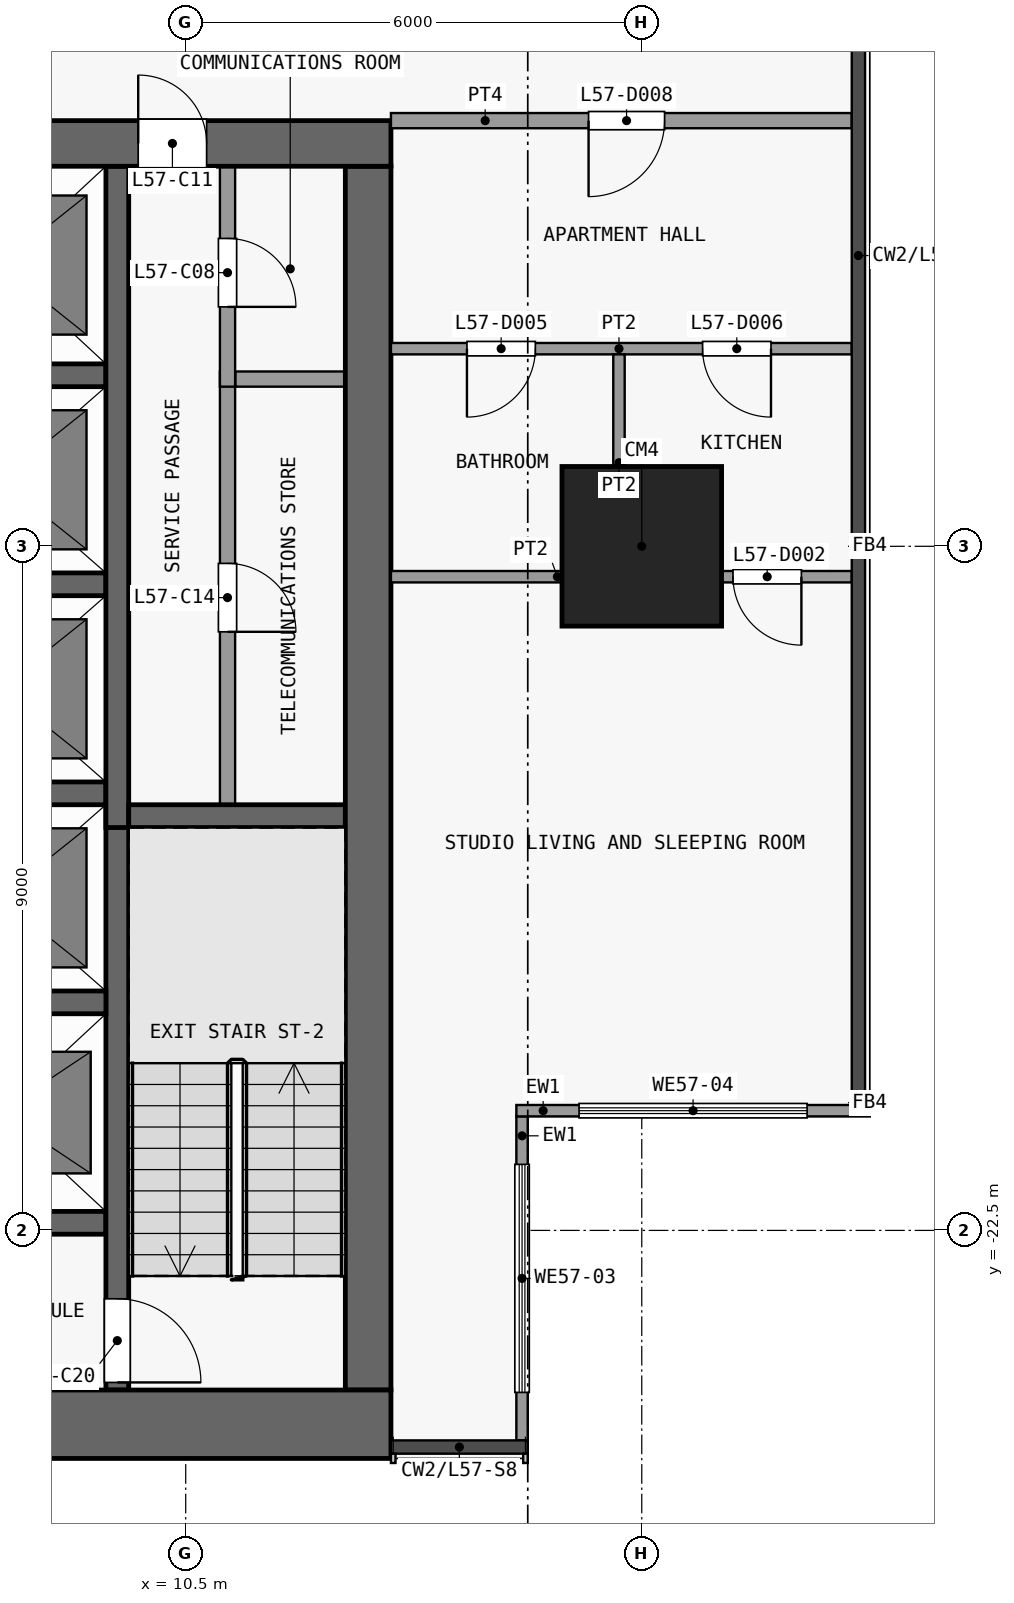
"""IFC4 building model, lengths in metres.
Left out: names, types, materials, properties, quantities, classifications, styles, units other than length and angle.
Written with IfcOpenShell. Run it as: python <this file> out.ifc"""

import sys

from ifc_helpers import new_model, si_unit, direction, frame, frame_2d, origin, origin_2d, place, context, subcontext, project, spatial, rectangle, extrude, element, fill, save


model = new_model("IFC4")
c1 = context("Model", 3, precision=1e-05, world=origin(), true_north=direction((0.0, 1.0)))
c2 = subcontext(c1, "Body", "Model", "MODEL_VIEW")
j1 = project(units=[si_unit("LENGTHUNIT", "METRE"), si_unit("PLANEANGLEUNIT", "RADIAN")], contexts=[c1])
p1 = place(None, origin())
s1 = spatial("IfcSite", under=j1, at=p1, CompositionType="ELEMENT")
p2 = place(p1, origin())
s2 = spatial("IfcBuilding", under=s1, at=p2, CompositionType="ELEMENT")
p3 = place(p2, frame((0.0, 0.0, 226.7)))
s3 = spatial("IfcBuildingStorey", under=s2, at=p3, CompositionType="ELEMENT", Elevation=226.7)
p4 = place(p3, frame((16.5, -13.5, 0.0), z_axis=(0.0, 0.0, 1.0), x_axis=(1.0, 0.0, 0.0)))
e1 = element("IfcColumn", 1, at=p4, inside=s3, PredefinedType="COLUMN", context=c2, shape_type="SweptSolid", body=[
    extrude(rectangle(XDim=2.1, YDim=2.1, at=origin_2d()), origin(), (0.0, 0.0, 1.0), 3.6),
])
p5 = place(p3, frame((-13.2, -25.05, 0.0), z_axis=(0.0, 0.0, 1.0), x_axis=(1.0, 0.0, 0.0)))
e2 = element("IfcWall", 2, at=p5, inside=s3, PredefinedType="SHEAR", context=c2, shape_type="SweptSolid", body=[
    extrude(rectangle(XDim=26.4, YDim=0.9, at=frame_2d((13.2, 0.0))), origin(), (0.0, 0.0, 1.0), 3.3),
])
p6 = place(p3, frame((-13.2, -8.2, 0.0), z_axis=(0.0, 0.0, 1.0), x_axis=(1.0, 0.0, 0.0)))
e3 = element("IfcWall", 3, at=p6, inside=s3, PredefinedType="SHEAR", context=c2, shape_type="SweptSolid", body=[
    extrude(rectangle(XDim=26.4, YDim=0.6, at=frame_2d((13.2, 0.0))), origin(), (0.0, 0.0, 1.0), 3.3),
])
p7 = place(p6, frame((7.5, 0.0, 0.0)))
e4 = element("IfcOpeningElement", 4, at=p7, cuts=e3, PredefinedType="OPENING", context=c2, shape_type="SweptSolid", body=[
    extrude(rectangle(XDim=1.8, YDim=2.1, at=frame_2d((0.9, 1.05))), frame((0.0, 0.31, 0.0), z_axis=(0.0, -1.0, 0.0), x_axis=(1.0, 0.0, 0.0)), (0.0, 0.0, 1.0), 0.62),
])
p8 = place(p6, frame((17.1, 0.0, 0.0)))
e5 = element("IfcOpeningElement", 5, at=p8, cuts=e3, PredefinedType="OPENING", context=c2, shape_type="SweptSolid", body=[
    extrude(rectangle(XDim=1.8, YDim=2.1, at=frame_2d((0.9, 1.05))), frame((0.0, 0.31, 0.0), z_axis=(0.0, -1.0, 0.0), x_axis=(1.0, 0.0, 0.0)), (0.0, 0.0, 1.0), 0.62),
])
p9 = place(p6, frame((2.425, 0.0, 0.0)))
e6 = element("IfcOpeningElement", 6, at=p9, cuts=e3, PredefinedType="OPENING", context=c2, shape_type="SweptSolid", body=[
    extrude(rectangle(XDim=0.9, YDim=2.1, at=frame_2d((0.45, 1.05))), frame((0.0, 0.31, 0.0), z_axis=(0.0, -1.0, 0.0), x_axis=(1.0, 0.0, 0.0)), (0.0, 0.0, 1.0), 0.62),
])
p10 = place(p6, frame((23.075, 0.0, 0.0)))
e7 = element("IfcOpeningElement", 7, at=p10, cuts=e3, PredefinedType="OPENING", context=c2, shape_type="SweptSolid", body=[
    extrude(rectangle(XDim=0.9, YDim=2.1, at=frame_2d((0.45, 1.05))), frame((0.0, 0.31, 0.0), z_axis=(0.0, -1.0, 0.0), x_axis=(1.0, 0.0, 0.0)), (0.0, 0.0, 1.0), 0.62),
])
p11 = place(p3, frame((12.9, -24.6, 0.0), z_axis=(0.0, 0.0, 1.0), x_axis=(0.0, 1.0, 0.0)))
e8 = element("IfcWall", 8, at=p11, inside=s3, PredefinedType="SHEAR", context=c2, shape_type="SweptSolid", body=[
    extrude(rectangle(XDim=16.1, YDim=0.6, at=frame_2d((8.05, 0.0))), origin(), (0.0, 0.0, 1.0), 3.3),
])
for number, where, z_axis, x_axis in (
    (9, (6.65, -22.4, 0.0), (0.0, 0.0, 1.0), (1.0, 0.0, 0.0)),
    (10, (6.65, -19.5, 0.0), (0.0, 0.0, 1.0), (1.0, 0.0, 0.0)),
):
    element("IfcWall", number, at=place(p3, frame(where, z_axis=z_axis, x_axis=x_axis)), inside=s3, PredefinedType="SHEAR", context=c2, shape_type="SweptSolid", body=[
        extrude(rectangle(XDim=2.8, YDim=0.3, at=frame_2d((1.4, 0.0))), origin(), (0.0, 0.0, 1.0), 3.3),
    ])
p12 = place(p3, frame((9.75, -17.05, 0.0), z_axis=(0.0, 0.0, 1.0), x_axis=(1.0, 0.0, 0.0)))
e11 = element("IfcWall", 11, at=p12, inside=s3, PredefinedType="SHEAR", context=c2, shape_type="SweptSolid", body=[
    extrude(rectangle(XDim=2.85, YDim=0.3, at=frame_2d((1.425, 0.0))), origin(), (0.0, 0.0, 1.0), 3.3),
])
for number, where, z_axis, x_axis in (
    (12, (6.65, -16.75, 0.0), (0.0, 0.0, 1.0), (1.0, 0.0, 0.0)),
    (13, (6.65, -14.0, 0.0), (0.0, 0.0, 1.0), (1.0, 0.0, 0.0)),
):
    element("IfcWall", number, at=place(p3, frame(where, z_axis=z_axis, x_axis=x_axis)), inside=s3, PredefinedType="SHEAR", context=c2, shape_type="SweptSolid", body=[
        extrude(rectangle(XDim=2.8, YDim=0.3, at=frame_2d((1.4, 0.0))), origin(), (0.0, 0.0, 1.0), 3.3),
    ])
p13 = place(p3, frame((11.15, -11.3, 0.0), z_axis=(0.0, 0.0, 1.0), x_axis=(1.0, 0.0, 0.0)))
e14 = element("IfcWall", 14, at=p13, inside=s3, PredefinedType="PARTITIONING", context=c2, shape_type="SweptSolid", body=[
    extrude(rectangle(XDim=1.45, YDim=0.2, at=frame_2d((0.725, 0.0))), origin(), (0.0, 0.0, 1.0), 3.3),
])
p14 = place(p3, frame((6.65, -11.25, 0.0), z_axis=(0.0, 0.0, 1.0), x_axis=(1.0, 0.0, 0.0)))
e15 = element("IfcWall", 15, at=p14, inside=s3, PredefinedType="SHEAR", context=c2, shape_type="SweptSolid", body=[
    extrude(rectangle(XDim=2.8, YDim=0.3, at=frame_2d((1.4, 0.0))), origin(), (0.0, 0.0, 1.0), 3.3),
])
p15 = place(p3, frame((9.6, -16.9, 0.0), z_axis=(0.0, 0.0, 1.0), x_axis=(0.0, -1.0, 0.0)))
e16 = element("IfcWall", 16, at=p15, inside=s3, PredefinedType="SHEAR", context=c2, shape_type="SweptSolid", body=[
    extrude(rectangle(XDim=7.7, YDim=0.3, at=frame_2d((3.85, 0.0))), origin(), (0.0, 0.0, 1.0), 3.3),
])
p16 = place(p15, frame((6.5, 0.0, 0.0)))
e17 = element("IfcOpeningElement", 17, at=p16, cuts=e16, PredefinedType="OPENING", context=c2, shape_type="SweptSolid", body=[
    extrude(rectangle(XDim=1.1, YDim=2.1, at=frame_2d((0.55, 1.05))), frame((0.0, 0.16, 0.0), z_axis=(0.0, -1.0, 0.0), x_axis=(1.0, 0.0, 0.0)), (0.0, 0.0, 1.0), 0.32),
])
p17 = place(p3, frame((9.6, -17.2, 0.0), z_axis=(0.0, 0.0, 1.0), x_axis=(0.0, 1.0, 0.0)))
e18 = element("IfcWall", 18, at=p17, inside=s3, PredefinedType="SHEAR", context=c2, shape_type="SweptSolid", body=[
    extrude(rectangle(XDim=8.7, YDim=0.3, at=frame_2d((4.35, 0.0))), origin(), (0.0, 0.0, 1.0), 3.3),
])
p18 = place(p3, frame((11.05, -11.2, 0.0), z_axis=(0.0, 0.0, 1.0), x_axis=(0.0, -1.0, 0.0)))
e19 = element("IfcWall", 19, at=p18, inside=s3, PredefinedType="PARTITIONING", context=c2, shape_type="SweptSolid", body=[
    extrude(rectangle(XDim=5.7, YDim=0.2, at=frame_2d((2.85, 0.0))), origin(), (0.0, 0.0, 1.0), 3.3),
])
p19 = place(p18, frame((2.525, 0.0, 0.0)))
e20 = element("IfcOpeningElement", 20, at=p19, cuts=e19, PredefinedType="OPENING", context=c2, shape_type="SweptSolid", body=[
    extrude(rectangle(XDim=0.9, YDim=2.1, at=frame_2d((0.45, 1.05))), frame((0.0, 0.11, 0.0), z_axis=(0.0, -1.0, 0.0), x_axis=(1.0, 0.0, 0.0)), (0.0, 0.0, 1.0), 0.22),
])
p20 = place(p3, frame((11.05, -8.5, 0.0), z_axis=(0.0, 0.0, 1.0), x_axis=(0.0, -1.0, 0.0)))
e21 = element("IfcWall", 21, at=p20, inside=s3, PredefinedType="PARTITIONING", context=c2, shape_type="SweptSolid", body=[
    extrude(rectangle(XDim=2.9, YDim=0.2, at=frame_2d((1.45, 0.0))), origin(), (0.0, 0.0, 1.0), 3.3),
])
p21 = place(p20, frame((0.95, 0.0, 0.0)))
e22 = element("IfcOpeningElement", 22, at=p21, cuts=e21, PredefinedType="OPENING", context=c2, shape_type="SweptSolid", body=[
    extrude(rectangle(XDim=0.9, YDim=2.1, at=frame_2d((0.45, 1.05))), frame((0.0, 0.11, 0.0), z_axis=(0.0, -1.0, 0.0), x_axis=(1.0, 0.0, 0.0)), (0.0, 0.0, 1.0), 0.22),
])
p22 = place(p3, frame((14.925, -21.0, 0.0), z_axis=(0.0, 0.0, 1.0), x_axis=(0.0, -1.0, 0.0)))
e23 = element("IfcWall", 23, at=p22, inside=s3, PredefinedType="SOLIDWALL", context=c2, shape_type="SweptSolid", body=[
    extrude(rectangle(XDim=4.262, YDim=0.15, at=frame_2d((2.131, 0.0))), origin(), (0.0, 0.0, 1.0), 3.3),
])
p23 = place(p22, frame((0.631, 0.0, 0.9)))
e24 = element("IfcOpeningElement", 24, at=p23, cuts=e23, PredefinedType="OPENING", context=c2, shape_type="SweptSolid", body=[
    extrude(rectangle(XDim=3.0, YDim=2.4, at=frame_2d((1.5, 1.2))), frame((0.0, 0.085, 0.0), z_axis=(0.0, -1.0, 0.0), x_axis=(1.0, 0.0, 0.0)), (0.0, 0.0, 1.0), 0.17),
])
p24 = place(p3, frame((19.5, -20.925, 0.0), z_axis=(0.0, 0.0, 1.0), x_axis=(-1.0, 0.0, 0.0)))
e25 = element("IfcWall", 25, at=p24, inside=s3, PredefinedType="SOLIDWALL", context=c2, shape_type="SweptSolid", body=[
    extrude(rectangle(XDim=4.65, YDim=0.15, at=frame_2d((2.325, 0.0))), origin(), (0.0, 0.0, 1.0), 3.3),
])
p25 = place(p24, frame((0.825, 0.0, 0.9)))
e26 = element("IfcOpeningElement", 26, at=p25, cuts=e25, PredefinedType="OPENING", context=c2, shape_type="SweptSolid", body=[
    extrude(rectangle(XDim=3.0, YDim=2.4, at=frame_2d((1.5, 1.2))), frame((0.0, 0.085, 0.0), z_axis=(0.0, -1.0, 0.0), x_axis=(1.0, 0.0, 0.0)), (0.0, 0.0, 1.0), 0.17),
])
p26 = place(p3, frame((13.2, -13.9, 0.0), z_axis=(0.0, 0.0, 1.0), x_axis=(1.0, 0.0, 0.0)))
e27 = element("IfcWall", 27, at=p26, inside=s3, PredefinedType="PARTITIONING", context=c2, shape_type="SweptSolid", body=[
    extrude(rectangle(XDim=6.062, YDim=0.15, at=frame_2d((3.031, 0.0))), origin(), (0.0, 0.0, 1.0), 3.3),
])
p27 = place(p26, frame((4.5, 0.0, 0.0)))
e28 = element("IfcOpeningElement", 28, at=p27, cuts=e27, PredefinedType="OPENING", context=c2, shape_type="SweptSolid", body=[
    extrude(rectangle(XDim=0.9, YDim=2.1, at=frame_2d((0.45, 1.05))), frame((0.0, 0.085, 0.0), z_axis=(0.0, -1.0, 0.0), x_axis=(1.0, 0.0, 0.0)), (0.0, 0.0, 1.0), 0.17),
])
p28 = place(p3, frame((13.2, -10.9, 0.0), z_axis=(0.0, 0.0, 1.0), x_axis=(1.0, 0.0, 0.0)))
e29 = element("IfcWall", 29, at=p28, inside=s3, PredefinedType="PARTITIONING", context=c2, shape_type="SweptSolid", body=[
    extrude(rectangle(XDim=6.062, YDim=0.15, at=frame_2d((3.031, 0.0))), origin(), (0.0, 0.0, 1.0), 3.3),
])
p29 = place(p28, frame((1.0, 0.0, 0.0)))
e30 = element("IfcOpeningElement", 30, at=p29, cuts=e29, PredefinedType="OPENING", context=c2, shape_type="SweptSolid", body=[
    extrude(rectangle(XDim=0.9, YDim=2.1, at=frame_2d((0.45, 1.05))), frame((0.0, 0.085, 0.0), z_axis=(0.0, -1.0, 0.0), x_axis=(1.0, 0.0, 0.0)), (0.0, 0.0, 1.0), 0.17),
])
p30 = place(p28, frame((4.1, 0.0, 0.0)))
e31 = element("IfcOpeningElement", 31, at=p30, cuts=e29, PredefinedType="OPENING", context=c2, shape_type="SweptSolid", body=[
    extrude(rectangle(XDim=0.9, YDim=2.1, at=frame_2d((0.45, 1.05))), frame((0.0, 0.085, 0.0), z_axis=(0.0, -1.0, 0.0), x_axis=(1.0, 0.0, 0.0)), (0.0, 0.0, 1.0), 0.17),
])
p31 = place(p3, frame((13.2, -7.9, 0.0), z_axis=(0.0, 0.0, 1.0), x_axis=(1.0, 0.0, 0.0)))
e32 = element("IfcWall", 32, at=p31, inside=s3, PredefinedType="PARTITIONING", context=c2, shape_type="SweptSolid", body=[
    extrude(rectangle(XDim=6.062, YDim=0.2, at=frame_2d((3.031, 0.0))), origin(), (0.0, 0.0, 1.0), 3.3),
])
p32 = place(p31, frame((2.6, 0.0, 0.0)))
e33 = element("IfcOpeningElement", 33, at=p32, cuts=e32, PredefinedType="OPENING", context=c2, shape_type="SweptSolid", body=[
    extrude(rectangle(XDim=1.0, YDim=2.1, at=frame_2d((0.5, 1.05))), frame((0.0, 0.11, 0.0), z_axis=(0.0, -1.0, 0.0), x_axis=(1.0, 0.0, 0.0)), (0.0, 0.0, 1.0), 0.22),
])
p33 = place(p3, frame((16.2, -13.825, 0.0), z_axis=(0.0, 0.0, 1.0), x_axis=(0.0, 1.0, 0.0)))
e34 = element("IfcWall", 34, at=p33, inside=s3, PredefinedType="PARTITIONING", context=c2, shape_type="SweptSolid", body=[
    extrude(rectangle(XDim=2.85, YDim=0.15, at=frame_2d((1.425, 0.0))), origin(), (0.0, 0.0, 1.0), 3.3),
])
p34 = place(p21, origin())
e35 = element("IfcDoor", 35, at=p34, inside=s3, OperationType="SINGLE_SWING_RIGHT", PredefinedType="DOOR", context=c2, shape_type="SweptSolid", body=[
    extrude(rectangle(XDim=0.9, YDim=2.1, at=frame_2d((0.45, 1.05))), frame((0.0, 0.025, 0.0), z_axis=(0.0, -1.0, 0.0), x_axis=(1.0, 0.0, 0.0)), (0.0, 0.0, 1.0), 0.05),
])
fill(e22, e35)
p35 = place(p10, origin())
e36 = element("IfcDoor", 36, at=p35, inside=s3, OperationType="SINGLE_SWING_LEFT", PredefinedType="DOOR", context=c2, shape_type="SweptSolid", body=[
    extrude(rectangle(XDim=0.9, YDim=2.1, at=frame_2d((0.45, 1.05))), frame((0.0, 0.025, 0.0), z_axis=(0.0, -1.0, 0.0), x_axis=(1.0, 0.0, 0.0)), (0.0, 0.0, 1.0), 0.05),
])
fill(e7, e36)
p36 = place(p19, origin())
e37 = element("IfcDoor", 37, at=p36, inside=s3, OperationType="SINGLE_SWING_RIGHT", PredefinedType="DOOR", context=c2, shape_type="SweptSolid", body=[
    extrude(rectangle(XDim=0.9, YDim=2.1, at=frame_2d((0.45, 1.05))), frame((0.0, 0.025, 0.0), z_axis=(0.0, -1.0, 0.0), x_axis=(1.0, 0.0, 0.0)), (0.0, 0.0, 1.0), 0.05),
])
fill(e20, e37)
p37 = place(p16, origin())
e38 = element("IfcDoor", 38, at=p37, inside=s3, OperationType="SINGLE_SWING_RIGHT", PredefinedType="DOOR", context=c2, shape_type="SweptSolid", body=[
    extrude(rectangle(XDim=1.1, YDim=2.1, at=frame_2d((0.55, 1.05))), frame((0.0, 0.025, 0.0), z_axis=(0.0, -1.0, 0.0), x_axis=(1.0, 0.0, 0.0)), (0.0, 0.0, 1.0), 0.05),
])
fill(e17, e38)
p38 = place(p23, origin())
e39 = element("IfcWindow", 39, at=p38, inside=s3, PartitioningType="SINGLE_PANEL", PredefinedType="WINDOW", context=c2, shape_type="SweptSolid", body=[
    extrude(rectangle(XDim=3.0, YDim=2.4, at=frame_2d((1.5, 1.2))), frame((0.0, 0.03, 0.0), z_axis=(0.0, -1.0, 0.0), x_axis=(1.0, 0.0, 0.0)), (0.0, 0.0, 1.0), 0.06),
])
fill(e24, e39)
p39 = place(p25, origin())
e40 = element("IfcWindow", 40, at=p39, inside=s3, PartitioningType="SINGLE_PANEL", PredefinedType="WINDOW", context=c2, shape_type="SweptSolid", body=[
    extrude(rectangle(XDim=3.0, YDim=2.4, at=frame_2d((1.5, 1.2))), frame((0.0, 0.03, 0.0), z_axis=(0.0, -1.0, 0.0), x_axis=(1.0, 0.0, 0.0)), (0.0, 0.0, 1.0), 0.06),
])
fill(e26, e40)
p40 = place(p27, origin())
e41 = element("IfcDoor", 41, at=p40, inside=s3, OperationType="SINGLE_SWING_RIGHT", PredefinedType="DOOR", context=c2, shape_type="SweptSolid", body=[
    extrude(rectangle(XDim=0.9, YDim=2.1, at=frame_2d((0.45, 1.05))), frame((0.0, 0.025, 0.0), z_axis=(0.0, -1.0, 0.0), x_axis=(1.0, 0.0, 0.0)), (0.0, 0.0, 1.0), 0.05),
])
fill(e28, e41)
p41 = place(p29, origin())
e42 = element("IfcDoor", 42, at=p41, inside=s3, OperationType="SINGLE_SWING_LEFT", PredefinedType="DOOR", context=c2, shape_type="SweptSolid", body=[
    extrude(rectangle(XDim=0.9, YDim=2.1, at=frame_2d((0.45, 1.05))), frame((0.0, 0.025, 0.0), z_axis=(0.0, -1.0, 0.0), x_axis=(1.0, 0.0, 0.0)), (0.0, 0.0, 1.0), 0.05),
])
fill(e30, e42)
p42 = place(p30, origin())
e43 = element("IfcDoor", 43, at=p42, inside=s3, OperationType="SINGLE_SWING_RIGHT", PredefinedType="DOOR", context=c2, shape_type="SweptSolid", body=[
    extrude(rectangle(XDim=0.9, YDim=2.1, at=frame_2d((0.45, 1.05))), frame((0.0, 0.025, 0.0), z_axis=(0.0, -1.0, 0.0), x_axis=(1.0, 0.0, 0.0)), (0.0, 0.0, 1.0), 0.05),
])
fill(e31, e43)
p43 = place(p32, origin())
e44 = element("IfcDoor", 44, at=p43, inside=s3, OperationType="SINGLE_SWING_LEFT", PredefinedType="DOOR", context=c2, shape_type="SweptSolid", body=[
    extrude(rectangle(XDim=1.0, YDim=2.1, at=frame_2d((0.5, 1.05))), frame((0.0, 0.025, 0.0), z_axis=(0.0, -1.0, 0.0), x_axis=(1.0, 0.0, 0.0)), (0.0, 0.0, 1.0), 0.05),
])
fill(e33, e44)
save(model, sys.argv[1])
